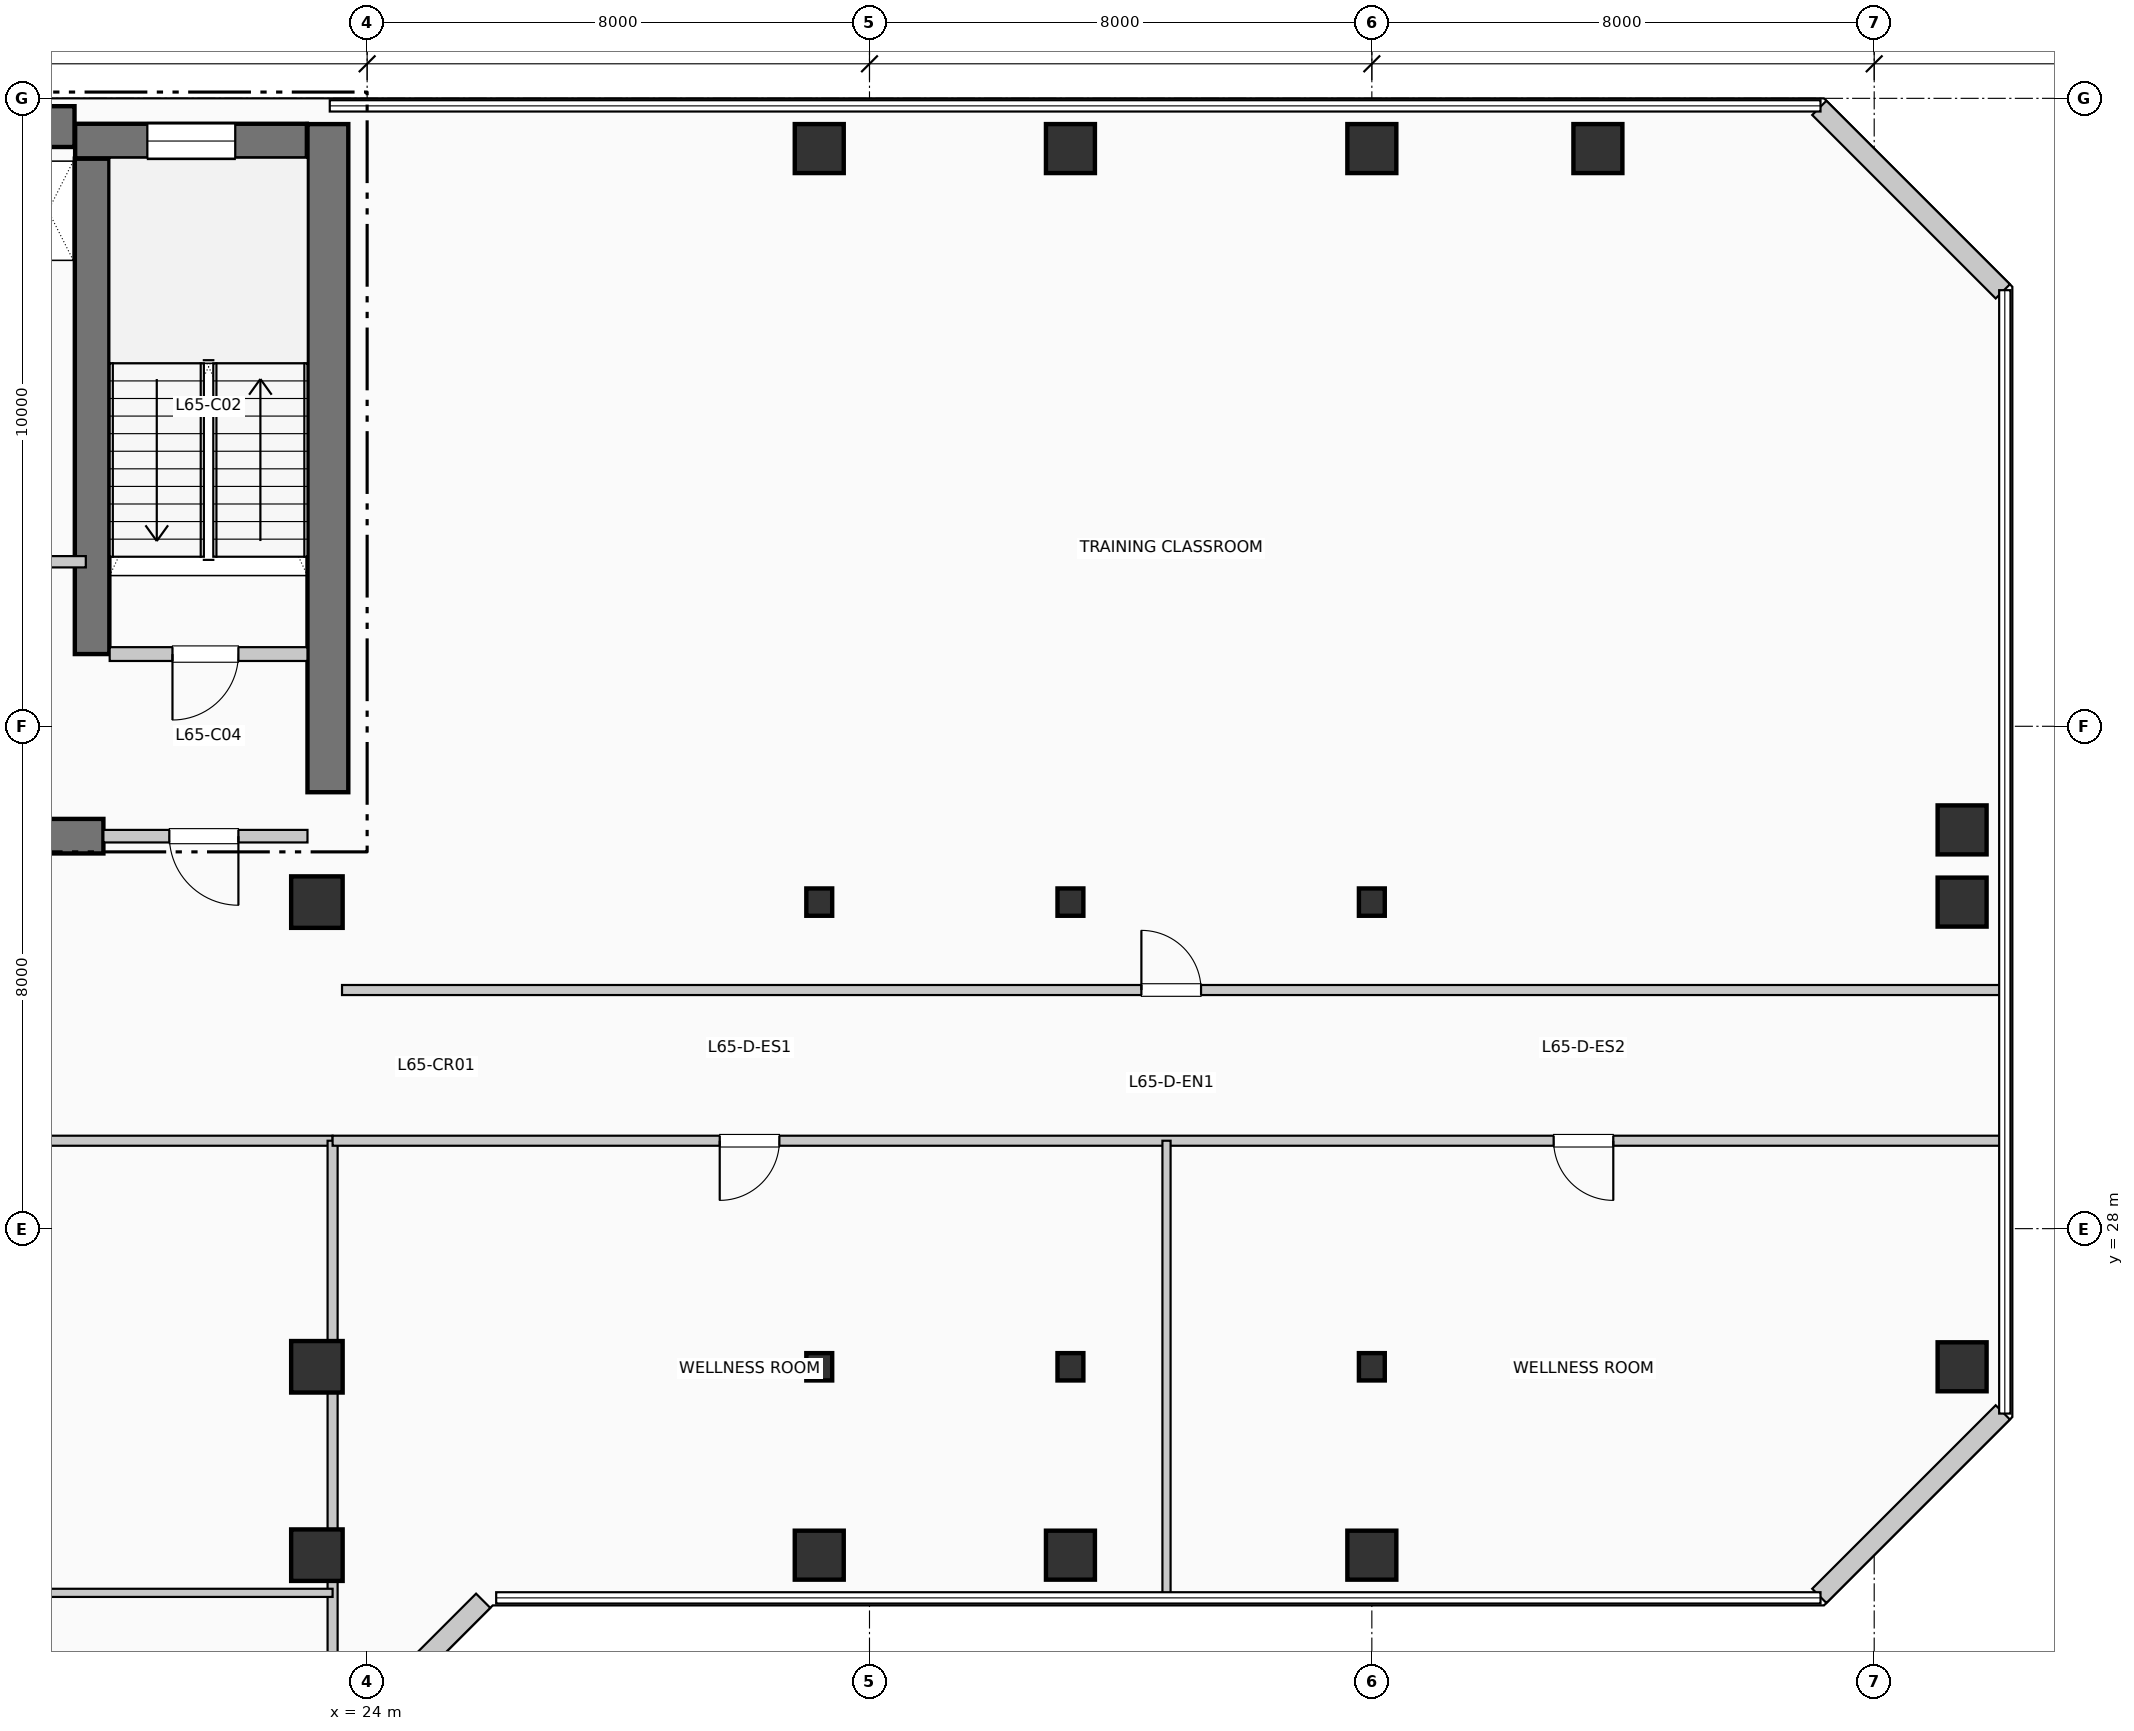
"""IFC4 building model, lengths in metres.
Left out: names, types, materials, properties, quantities, classifications, styles, units other than length and angle.
Written with IfcOpenShell. Run it as: python <this file> out.ifc"""

import sys

from ifc_helpers import new_model, si_unit, direction, frame, frame_2d, origin, origin_2d, place, context, subcontext, project, spatial, rectangle, i_section, extrude, element, fill, save


model = new_model("IFC4")
c1 = context("Model", 3, precision=1e-05, world=origin(), true_north=direction((0.0, 1.0)))
c2 = subcontext(c1, "Body", "Model", "MODEL_VIEW")
j1 = project(units=[si_unit("LENGTHUNIT", "METRE"), si_unit("PLANEANGLEUNIT", "RADIAN")], contexts=[c1])
p1 = place(None, origin())
s1 = spatial("IfcSite", under=j1, at=p1, CompositionType="ELEMENT")
p2 = place(p1, origin())
s2 = spatial("IfcBuilding", under=s1, at=p2, CompositionType="ELEMENT")
p3 = place(p2, frame((0.0, 0.0, 268.29)))
s3 = spatial("IfcBuildingStorey", under=s2, at=p3, CompositionType="ELEMENT", Elevation=268.29)
p4 = place(p3, frame((5.36, 45.55, 0.0), z_axis=(0.0, 0.0, 1.0), x_axis=(1.0, 0.0, 0.0)))
e1 = element("IfcWall", 1, at=p4, inside=s3, PredefinedType="SHEAR", context=c2, shape_type="SweptSolid", body=[
    extrude(rectangle(XDim=13.98, YDim=0.65, at=frame_2d((6.99, 0.0))), origin(), (0.0, 0.0, 1.0), 3.96),
])
p5 = place(p3, frame((23.375, 34.95, 0.0), z_axis=(0.0, 0.0, 1.0), x_axis=(0.0, 1.0, 0.0)))
e2 = element("IfcWall", 2, at=p5, inside=s3, PredefinedType="SHEAR", context=c2, shape_type="SweptSolid", body=[
    extrude(rectangle(XDim=10.64, YDim=0.65, at=frame_2d((5.32, 0.0))), origin(), (0.0, 0.0, 1.0), 3.96),
])
p6 = place(p3, frame((13.68, 34.25, 0.0), z_axis=(0.0, 0.0, 1.0), x_axis=(1.0, 0.0, 0.0)))
e3 = element("IfcWall", 3, at=p6, inside=s3, PredefinedType="SHEAR", context=c2, shape_type="SweptSolid", body=[
    extrude(rectangle(XDim=6.12, YDim=0.55, at=frame_2d((3.06, 0.0))), origin(), (0.0, 0.0, 1.0), 3.96),
])
p7 = place(p3, frame((19.62, 37.15, 0.0), z_axis=(0.0, 0.0, 1.0), x_axis=(0.0, 1.0, 0.0)))
e4 = element("IfcWall", 4, at=p7, inside=s3, PredefinedType="SHEAR", context=c2, shape_type="SweptSolid", body=[
    extrude(rectangle(XDim=7.89, YDim=0.55, at=frame_2d((3.945, 0.0))), origin(), (0.0, 0.0, 1.0), 3.96),
])
p8 = place(p3, frame((19.35, 45.32, 0.0), z_axis=(0.0, 0.0, 1.0), x_axis=(1.0, 0.0, 0.0)))
e5 = element("IfcWall", 5, at=p8, inside=s3, PredefinedType="SHEAR", context=c2, shape_type="SweptSolid", body=[
    extrude(rectangle(XDim=3.69, YDim=0.55, at=frame_2d((1.845, 0.0))), origin(), (0.0, 0.0, 1.0), 3.96),
])
p9 = place(p8, frame((1.15, 0.0, 1.05)))
e6 = element("IfcOpeningElement", 6, at=p9, cuts=e5, PredefinedType="OPENING", context=c2, shape_type="SweptSolid", body=[
    extrude(rectangle(XDim=1.4, YDim=1.8, at=frame_2d((0.7, 0.9))), frame((0.0, 0.285, 0.0), z_axis=(0.0, -1.0, 0.0), x_axis=(1.0, 0.0, 0.0)), (0.0, 0.0, 1.0), 0.57),
])
for number, where, z_axis, x_axis in (
    (7, (23.2, 22.8, 0.0), (0.0, 0.0, 1.0), (1.0, 0.0, 0.0)),
    (8, (23.2, 25.8, 0.0), (0.0, 0.0, 1.0), (1.0, 0.0, 0.0)),
    (9, (23.2, 33.2, 0.0), (0.0, 0.0, 1.0), (1.0, 0.0, 0.0)),
):
    element("IfcColumn", number, at=place(p3, frame(where, z_axis=z_axis, x_axis=x_axis)), inside=s3, PredefinedType="COLUMN", context=c2, shape_type="SweptSolid", body=[
        extrude(rectangle(XDim=0.82, YDim=0.82, at=origin_2d()), origin(), (0.0, 0.0, 1.0), 3.96),
    ])
p10 = place(p3, frame((31.2, 22.8, 0.0), z_axis=(0.0, 0.0, 1.0), x_axis=(1.0, 0.0, 0.0)))
e10 = element("IfcColumn", 10, at=p10, inside=s3, PredefinedType="COLUMN", context=c2, shape_type="SweptSolid", body=[
    extrude(rectangle(XDim=0.78, YDim=0.78, at=origin_2d()), origin(), (0.0, 0.0, 1.0), 3.96),
])
for number, where, z_axis, x_axis in (
    (11, (31.2, 25.8, 0.0), (0.0, 0.0, 1.0), (1.0, 0.0, 0.0)),
    (12, (31.2, 33.2, 0.0), (0.0, 0.0, 1.0), (1.0, 0.0, 0.0)),
):
    element("IfcColumn", number, at=place(p3, frame(where, z_axis=z_axis, x_axis=x_axis)), inside=s3, PredefinedType="COLUMN", context=c2, shape_type="SweptSolid", body=[
        extrude(i_section(OverallWidth=0.412, OverallDepth=0.435, WebThickness=0.027, FlangeThickness=0.043, at=origin_2d()), origin(), (0.0, 0.0, 1.0), 3.96),
    ])
for number, where, z_axis, x_axis in (
    (13, (31.2, 45.2, 0.0), (0.0, 0.0, 1.0), (1.0, 0.0, 0.0)),
    (14, (35.2, 22.8, 0.0), (0.0, 0.0, 1.0), (1.0, 0.0, 0.0)),
):
    element("IfcColumn", number, at=place(p3, frame(where, z_axis=z_axis, x_axis=x_axis)), inside=s3, PredefinedType="COLUMN", context=c2, shape_type="SweptSolid", body=[
        extrude(rectangle(XDim=0.78, YDim=0.78, at=origin_2d()), origin(), (0.0, 0.0, 1.0), 3.96),
    ])
for number, where, z_axis, x_axis in (
    (15, (35.2, 25.8, 0.0), (0.0, 0.0, 1.0), (1.0, 0.0, 0.0)),
    (16, (35.2, 33.2, 0.0), (0.0, 0.0, 1.0), (1.0, 0.0, 0.0)),
):
    element("IfcColumn", number, at=place(p3, frame(where, z_axis=z_axis, x_axis=x_axis)), inside=s3, PredefinedType="COLUMN", context=c2, shape_type="SweptSolid", body=[
        extrude(i_section(OverallWidth=0.412, OverallDepth=0.435, WebThickness=0.027, FlangeThickness=0.043, at=origin_2d()), origin(), (0.0, 0.0, 1.0), 3.96),
    ])
for number, where, z_axis, x_axis in (
    (17, (35.2, 45.2, 0.0), (0.0, 0.0, 1.0), (1.0, 0.0, 0.0)),
    (18, (40.0, 22.8, 0.0), (0.0, 0.0, 1.0), (1.0, 0.0, 0.0)),
):
    element("IfcColumn", number, at=place(p3, frame(where, z_axis=z_axis, x_axis=x_axis)), inside=s3, PredefinedType="COLUMN", context=c2, shape_type="SweptSolid", body=[
        extrude(rectangle(XDim=0.78, YDim=0.78, at=origin_2d()), origin(), (0.0, 0.0, 1.0), 3.96),
    ])
for number, where, z_axis, x_axis in (
    (19, (40.0, 25.8, 0.0), (0.0, 0.0, 1.0), (1.0, 0.0, 0.0)),
    (20, (40.0, 33.2, 0.0), (0.0, 0.0, 1.0), (1.0, 0.0, 0.0)),
):
    element("IfcColumn", number, at=place(p3, frame(where, z_axis=z_axis, x_axis=x_axis)), inside=s3, PredefinedType="COLUMN", context=c2, shape_type="SweptSolid", body=[
        extrude(i_section(OverallWidth=0.412, OverallDepth=0.435, WebThickness=0.027, FlangeThickness=0.043, at=origin_2d()), origin(), (0.0, 0.0, 1.0), 3.96),
    ])
for number, where, z_axis, x_axis in (
    (21, (40.0, 45.2, 0.0), (0.0, 0.0, 1.0), (1.0, 0.0, 0.0)),
    (22, (43.6, 45.2, 0.0), (0.0, 0.0, 1.0), (1.0, 0.0, 0.0)),
    (23, (49.4, 25.8, 0.0), (0.0, 0.0, 1.0), (1.0, 0.0, 0.0)),
    (24, (49.4, 33.2, 0.0), (0.0, 0.0, 1.0), (1.0, 0.0, 0.0)),
    (25, (49.4, 34.35, 0.0), (0.0, 0.0, 1.0), (1.0, 0.0, 0.0)),
):
    element("IfcColumn", number, at=place(p3, frame(where, z_axis=z_axis, x_axis=x_axis)), inside=s3, PredefinedType="COLUMN", context=c2, shape_type="SweptSolid", body=[
        extrude(rectangle(XDim=0.78, YDim=0.78, at=origin_2d()), origin(), (0.0, 0.0, 1.0), 3.96),
    ])
p11 = place(p3, frame((23.926, 20.152, 0.0), z_axis=(0.0, 0.0, 1.0), x_axis=(0.707106781187, 0.707106781187, 0.0)))
e26 = element("IfcWall", 26, at=p11, inside=s3, PredefinedType="SOLIDWALL", context=c2, shape_type="SweptSolid", body=[
    extrude(rectangle(XDim=2.718, YDim=0.32, at=frame_2d((1.359, 0.0))), origin(), (0.0, 0.0, 1.0), 3.74),
])
for number, where, z_axis, x_axis in (
    (27, (47.126, 22.152, 0.0), (0.0, 0.0, 1.0), (0.707, 0.707, 0.0)),
    (28, (50.048, 42.926, 0.0), (0.0, 0.0, 1.0), (-0.707, 0.707, 0.0)),
):
    element("IfcWall", number, at=place(p3, frame(where, z_axis=z_axis, x_axis=x_axis)), inside=s3, PredefinedType="SOLIDWALL", context=c2, shape_type="SweptSolid", body=[
        extrude(rectangle(XDim=4.133, YDim=0.32, at=frame_2d((2.066, 0.0))), origin(), (0.0, 0.0, 1.0), 3.74),
    ])
p12 = place(p3, frame((19.9, 37.15, 0.0), z_axis=(0.0, 0.0, 1.0), x_axis=(1.0, 0.0, 0.0)))
e29 = element("IfcWall", 29, at=p12, inside=s3, PredefinedType="PARTITIONING", context=c2, shape_type="SweptSolid", body=[
    extrude(rectangle(XDim=3.15, YDim=0.22, at=frame_2d((1.575, 0.0))), origin(), (0.0, 0.0, 1.0), 3.74),
])
p13 = place(p12, frame((2.05, 0.0, 0.0), z_axis=(0.0, 0.0, 1.0), x_axis=(-1.0, 0.0, 0.0)))
e30 = element("IfcOpeningElement", 30, at=p13, cuts=e29, PredefinedType="OPENING", context=c2, shape_type="SweptSolid", body=[
    extrude(rectangle(XDim=1.05, YDim=2.15, at=frame_2d((0.525, 1.075))), frame((0.0, 0.12, 0.0), z_axis=(0.0, -1.0, 0.0), x_axis=(1.0, 0.0, 0.0)), (0.0, 0.0, 1.0), 0.24),
])
p14 = place(p3, frame((19.8, 34.25, 0.0), z_axis=(0.0, 0.0, 1.0), x_axis=(1.0, 0.0, 0.0)))
e31 = element("IfcWall", 31, at=p14, inside=s3, PredefinedType="PARTITIONING", context=c2, shape_type="SweptSolid", body=[
    extrude(rectangle(XDim=3.25, YDim=0.2, at=frame_2d((1.625, 0.0))), origin(), (0.0, 0.0, 1.0), 3.74),
])
p15 = place(p14, frame((2.15, 0.0, 0.0), z_axis=(0.0, 0.0, 1.0), x_axis=(-1.0, 0.0, 0.0)))
e32 = element("IfcOpeningElement", 32, at=p15, cuts=e31, PredefinedType="OPENING", context=c2, shape_type="SweptSolid", body=[
    extrude(rectangle(XDim=1.1, YDim=2.15, at=frame_2d((0.55, 1.075))), frame((0.0, 0.11, 0.0), z_axis=(0.0, -1.0, 0.0), x_axis=(1.0, 0.0, 0.0)), (0.0, 0.0, 1.0), 0.22),
])
p16 = place(p3, frame((17.68, 38.62, 0.0), z_axis=(0.0, 0.0, 1.0), x_axis=(1.0, 0.0, 0.0)))
e33 = element("IfcWall", 33, at=p16, inside=s3, PredefinedType="PARTITIONING", context=c2, shape_type="SweptSolid", body=[
    extrude(rectangle(XDim=1.84, YDim=0.18, at=frame_2d((0.92, 0.0))), origin(), (0.0, 0.0, 1.0), 3.74),
])
p17 = place(p16, frame((0.24, 0.0, 0.0)))
e34 = element("IfcOpeningElement", 34, at=p17, cuts=e33, PredefinedType="OPENING", context=c2, shape_type="SweptSolid", body=[
    extrude(rectangle(XDim=0.92, YDim=2.1, at=frame_2d((0.46, 1.05))), frame((0.0, 0.1, 0.0), z_axis=(0.0, -1.0, 0.0), x_axis=(1.0, 0.0, 0.0)), (0.0, 0.0, 1.0), 0.2),
])
p18 = place(p3, frame((11.64, 29.4, 0.0), z_axis=(0.0, 0.0, 1.0), x_axis=(1.0, 0.0, 0.0)))
e35 = element("IfcWall", 35, at=p18, inside=s3, PredefinedType="PARTITIONING", context=c2, shape_type="SweptSolid", body=[
    extrude(rectangle(XDim=11.81, YDim=0.16, at=frame_2d((5.905, 0.0))), origin(), (0.0, 0.0, 1.0), 3.395),
])
p19 = place(p3, frame((23.45, 5.99, 0.0), z_axis=(0.0, 0.0, 1.0), x_axis=(0.0, 1.0, 0.0)))
e36 = element("IfcWall", 36, at=p19, inside=s3, PredefinedType="PARTITIONING", context=c2, shape_type="SweptSolid", body=[
    extrude(rectangle(XDim=23.41, YDim=0.16, at=frame_2d((11.705, 0.0))), origin(), (0.0, 0.0, 1.0), 3.125),
])
p20 = place(p3, frame((11.64, 22.2, 0.0), z_axis=(0.0, 0.0, 1.0), x_axis=(1.0, 0.0, 0.0)))
e37 = element("IfcWall", 37, at=p20, inside=s3, PredefinedType="PARTITIONING", context=c2, shape_type="SweptSolid", body=[
    extrude(rectangle(XDim=11.81, YDim=0.13, at=frame_2d((5.905, 0.0))), origin(), (0.0, 0.0, 1.0), 3.74),
])
p21 = place(p3, frame((23.45, 29.4, 0.0), z_axis=(0.0, 0.0, 1.0), x_axis=(1.0, 0.0, 0.0)))
e38 = element("IfcWall", 38, at=p21, inside=s3, PredefinedType="PARTITIONING", context=c2, shape_type="SweptSolid", body=[
    extrude(rectangle(XDim=26.56, YDim=0.16, at=frame_2d((13.28, 0.0))), origin(), (0.0, 0.0, 1.0), 3.335),
])
p22 = place(p21, frame((7.115, 0.0, 0.0), z_axis=(0.0, 0.0, 1.0), x_axis=(-1.0, 0.0, 0.0)))
e39 = element("IfcOpeningElement", 39, at=p22, cuts=e38, PredefinedType="OPENING", context=c2, shape_type="SweptSolid", body=[
    extrude(rectangle(XDim=0.95, YDim=2.15, at=frame_2d((0.475, 1.075))), frame((0.0, 0.09, 0.0), z_axis=(0.0, -1.0, 0.0), x_axis=(1.0, 0.0, 0.0)), (0.0, 0.0, 1.0), 0.18),
])
p23 = place(p21, frame((20.395, 0.0, 0.0), z_axis=(0.0, 0.0, 1.0), x_axis=(-1.0, 0.0, 0.0)))
e40 = element("IfcOpeningElement", 40, at=p23, cuts=e38, PredefinedType="OPENING", context=c2, shape_type="SweptSolid", body=[
    extrude(rectangle(XDim=0.95, YDim=2.15, at=frame_2d((0.475, 1.075))), frame((0.0, 0.09, 0.0), z_axis=(0.0, -1.0, 0.0), x_axis=(1.0, 0.0, 0.0)), (0.0, 0.0, 1.0), 0.18),
])
p24 = place(p3, frame((23.6, 31.8, 0.0), z_axis=(0.0, 0.0, 1.0), x_axis=(1.0, 0.0, 0.0)))
e41 = element("IfcWall", 41, at=p24, inside=s3, PredefinedType="PARTITIONING", context=c2, shape_type="SweptSolid", body=[
    extrude(rectangle(XDim=26.41, YDim=0.16, at=frame_2d((13.205, 0.0))), origin(), (0.0, 0.0, 1.0), 3.74),
])
p25 = place(p24, frame((12.73, 0.0, 0.0)))
e42 = element("IfcOpeningElement", 42, at=p25, cuts=e41, PredefinedType="OPENING", context=c2, shape_type="SweptSolid", body=[
    extrude(rectangle(XDim=0.95, YDim=2.15, at=frame_2d((0.475, 1.075))), frame((0.0, 0.09, 0.0), z_axis=(0.0, -1.0, 0.0), x_axis=(1.0, 0.0, 0.0)), (0.0, 0.0, 1.0), 0.18),
])
p26 = place(p3, frame((36.73, 22.19, 0.0), z_axis=(0.0, 0.0, 1.0), x_axis=(0.0, 1.0, 0.0)))
e43 = element("IfcWall", 43, at=p26, inside=s3, PredefinedType="PARTITIONING", context=c2, shape_type="SweptSolid", body=[
    extrude(rectangle(XDim=7.21, YDim=0.13, at=frame_2d((3.605, 0.0))), origin(), (0.0, 0.0, 1.0), 3.74),
])
p27 = place(p9, origin())
e44 = element("IfcWindow", 44, at=p27, inside=s3, PartitioningType="SINGLE_PANEL", PredefinedType="WINDOW", context=c2, shape_type="SweptSolid", body=[
    extrude(rectangle(XDim=1.4, YDim=1.8, at=frame_2d((0.7, 0.9))), frame((0.0, 0.03, 0.0), z_axis=(0.0, -1.0, 0.0), x_axis=(1.0, 0.0, 0.0)), (0.0, 0.0, 1.0), 0.06),
])
fill(e6, e44)
p28 = place(p13, origin())
e45 = element("IfcDoor", 45, at=p28, inside=s3, OperationType="SINGLE_SWING_LEFT", PredefinedType="DOOR", context=c2, shape_type="SweptSolid", body=[
    extrude(rectangle(XDim=1.05, YDim=2.15, at=frame_2d((0.525, 1.075))), frame((0.0, 0.025, 0.0), z_axis=(0.0, -1.0, 0.0), x_axis=(1.0, 0.0, 0.0)), (0.0, 0.0, 1.0), 0.05),
])
fill(e30, e45)
p29 = place(p15, origin())
e46 = element("IfcDoor", 46, at=p29, inside=s3, OperationType="SINGLE_SWING_RIGHT", PredefinedType="DOOR", context=c2, shape_type="SweptSolid", body=[
    extrude(rectangle(XDim=1.1, YDim=2.15, at=frame_2d((0.55, 1.075))), frame((0.0, 0.025, 0.0), z_axis=(0.0, -1.0, 0.0), x_axis=(1.0, 0.0, 0.0)), (0.0, 0.0, 1.0), 0.05),
])
fill(e32, e46)
p30 = place(p22, origin())
e47 = element("IfcDoor", 47, at=p30, inside=s3, OperationType="SINGLE_SWING_LEFT", PredefinedType="DOOR", context=c2, shape_type="SweptSolid", body=[
    extrude(rectangle(XDim=0.95, YDim=2.15, at=frame_2d((0.475, 1.075))), frame((0.0, 0.025, 0.0), z_axis=(0.0, -1.0, 0.0), x_axis=(1.0, 0.0, 0.0)), (0.0, 0.0, 1.0), 0.05),
])
fill(e39, e47)
p31 = place(p23, origin())
e48 = element("IfcDoor", 48, at=p31, inside=s3, OperationType="SINGLE_SWING_RIGHT", PredefinedType="DOOR", context=c2, shape_type="SweptSolid", body=[
    extrude(rectangle(XDim=0.95, YDim=2.15, at=frame_2d((0.475, 1.075))), frame((0.0, 0.025, 0.0), z_axis=(0.0, -1.0, 0.0), x_axis=(1.0, 0.0, 0.0)), (0.0, 0.0, 1.0), 0.05),
])
fill(e40, e48)
p32 = place(p25, origin())
e49 = element("IfcDoor", 49, at=p32, inside=s3, OperationType="SINGLE_SWING_LEFT", PredefinedType="DOOR", context=c2, shape_type="SweptSolid", body=[
    extrude(rectangle(XDim=0.95, YDim=2.15, at=frame_2d((0.475, 1.075))), frame((0.0, 0.025, 0.0), z_axis=(0.0, -1.0, 0.0), x_axis=(1.0, 0.0, 0.0)), (0.0, 0.0, 1.0), 0.05),
])
fill(e42, e49)
save(model, sys.argv[1])
